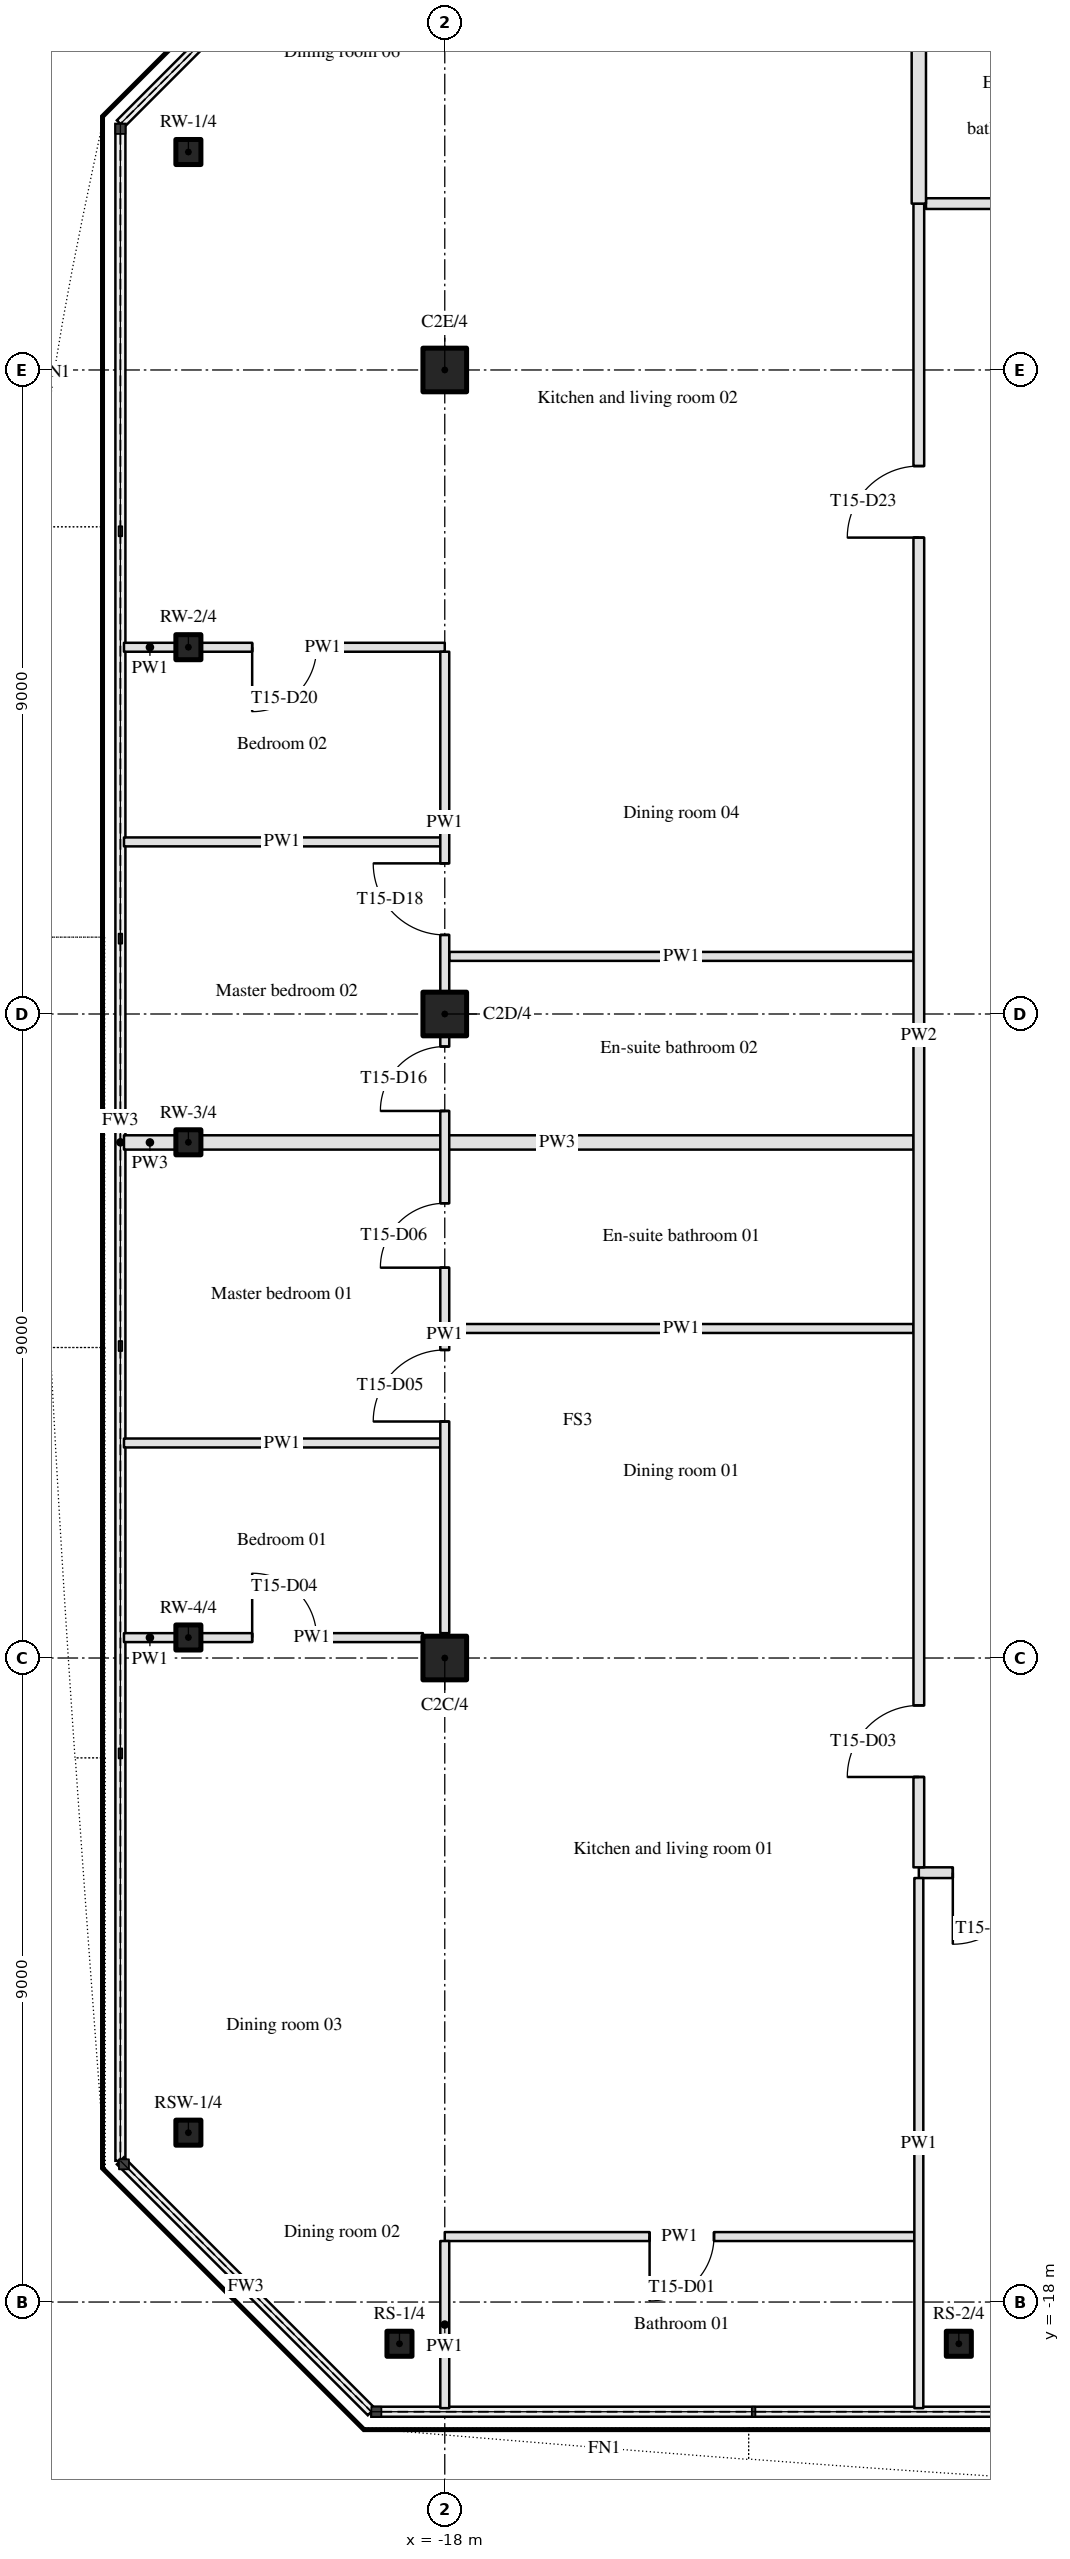
"""IFC4 building model, lengths in metres.
Left out: names, types, materials, properties, quantities, classifications, styles, units other than length and angle.
Written with IfcOpenShell. Run it as: python <this file> out.ifc"""

import sys

from ifc_helpers import new_model, si_unit, direction, frame, frame_2d, origin, origin_2d, place, context, subcontext, project, spatial, rectangle, hollow_rectangle, hollow_circle, extrude, element, fill, save


model = new_model("IFC4")
c1 = context("Model", 3, precision=1e-05, world=origin(), true_north=direction((0.0, 1.0)))
c2 = subcontext(c1, "Body", "Model", "MODEL_VIEW")
j1 = project(units=[si_unit("LENGTHUNIT", "METRE"), si_unit("PLANEANGLEUNIT", "RADIAN")], contexts=[c1])
p1 = place(None, origin())
s1 = spatial("IfcSite", under=j1, at=p1, CompositionType="ELEMENT")
p2 = place(p1, origin())
s2 = spatial("IfcBuilding", under=s1, at=p2, CompositionType="ELEMENT")
p3 = place(p2, frame((0.0, 0.0, 206.85)))
s3 = spatial("IfcBuildingStorey", under=s2, at=p3, CompositionType="ELEMENT", Elevation=206.85)
for number, where, z_axis, x_axis in (
    (1, (-18.0, -9.0, 0.0), (0.0, 0.0, 1.0), (1.0, 0.0, 0.0)),
    (2, (-18.0, 0.0, 0.0), (0.0, 0.0, 1.0), (1.0, 0.0, 0.0)),
    (3, (-18.0, 9.0, 0.0), (0.0, 0.0, 1.0), (1.0, 0.0, 0.0)),
):
    element("IfcColumn", number, at=place(p3, frame(where, z_axis=z_axis, x_axis=x_axis)), inside=s3, PredefinedType="COLUMN", context=c2, shape_type="SweptSolid", body=[
        extrude(hollow_circle(Radius=0.305, WallThickness=0.03, at=origin_2d()), origin(), (0.0, 0.0, 1.0), 3.15),
    ])
for number, where, z_axis, x_axis in (
    (4, (-18.633, -18.583, 0.0), (0.0, 0.0, 1.0), (1.0, 0.0, 0.0)),
    (5, (-10.816, -18.583, 0.0), (0.0, 0.0, 1.0), (1.0, 0.0, 0.0)),
    (6, (-21.583, 12.046, 0.0), (0.0, 0.0, 1.0), (1.0, 0.0, 0.0)),
    (7, (-21.583, 5.126, 0.0), (0.0, 0.0, 1.0), (1.0, 0.0, 0.0)),
    (8, (-21.583, -1.793, 0.0), (0.0, 0.0, 1.0), (1.0, 0.0, 0.0)),
    (9, (-21.583, -8.713, 0.0), (0.0, 0.0, 1.0), (1.0, 0.0, 0.0)),
    (10, (-21.583, -15.633, 0.0), (0.0, 0.0, 1.0), (1.0, 0.0, 0.0)),
):
    element("IfcColumn", number, at=place(p3, frame(where, z_axis=z_axis, x_axis=x_axis)), inside=s3, PredefinedType="COLUMN", context=c2, shape_type="SweptSolid", body=[
        extrude(hollow_rectangle(XDim=0.35, YDim=0.35, WallThickness=0.02, InnerFilletRadius=0.03, OuterFilletRadius=0.05, at=origin_2d()), origin(), (0.0, 0.0, 1.0), 3.15),
    ])
p4 = place(p3, frame((-11.438, -17.085, 0.0), z_axis=(0.0, 0.0, 1.0), x_axis=(-1.0, 0.0, 0.0)))
e11 = element("IfcWall", 11, at=p4, inside=s3, PredefinedType="PARTITIONING", context=c2, shape_type="SweptSolid", body=[
    extrude(rectangle(XDim=6.562, YDim=0.125, at=frame_2d((3.281, 0.0))), origin(), (0.0, 0.0, 1.0), 2.21),
])
p5 = place(p4, frame((2.8, 0.0, 0.0)))
e12 = element("IfcOpeningElement", 12, at=p5, cuts=e11, PredefinedType="OPENING", context=c2, shape_type="SweptSolid", body=[
    extrude(rectangle(XDim=0.9, YDim=2.1, at=frame_2d((0.45, 1.05))), frame((0.0, 0.073, 0.0), z_axis=(0.0, -1.0, 0.0), x_axis=(1.0, 0.0, 0.0)), (0.0, 0.0, 1.0), 0.145),
])
p6 = place(p3, frame((-9.5, -12.0, 0.0), z_axis=(0.0, 0.0, 1.0), x_axis=(-1.0, 0.0, 0.0)))
e13 = element("IfcWall", 13, at=p6, inside=s3, PredefinedType="PARTITIONING", context=c2, shape_type="SweptSolid", body=[
    extrude(rectangle(XDim=1.875, YDim=0.15, at=frame_2d((0.938, 0.0))), origin(), (0.0, 0.0, 1.0), 2.21),
])
p7 = place(p6, frame((0.4, 0.0, 0.0)))
e14 = element("IfcOpeningElement", 14, at=p7, cuts=e13, PredefinedType="OPENING", context=c2, shape_type="SweptSolid", body=[
    extrude(rectangle(XDim=1.0, YDim=2.1, at=frame_2d((0.5, 1.05))), frame((0.0, 0.085, 0.0), z_axis=(0.0, -1.0, 0.0), x_axis=(1.0, 0.0, 0.0)), (0.0, 0.0, 1.0), 0.17),
])
p8 = place(p3, frame((-22.483, -8.715, 0.0), z_axis=(0.0, 0.0, 1.0), x_axis=(1.0, 0.0, 0.0)))
e15 = element("IfcWall", 15, at=p8, inside=s3, PredefinedType="PARTITIONING", context=c2, shape_type="SweptSolid", body=[
    extrude(rectangle(XDim=0.725, YDim=0.125, at=frame_2d((0.362, 0.0))), origin(), (0.0, 0.0, 1.0), 2.21),
])
p9 = place(p3, frame((-21.408, -8.715, 0.0), z_axis=(0.0, 0.0, 1.0), x_axis=(1.0, 0.0, 0.0)))
e16 = element("IfcWall", 16, at=p9, inside=s3, PredefinedType="PARTITIONING", context=c2, shape_type="SweptSolid", body=[
    extrude(rectangle(XDim=3.103, YDim=0.125, at=frame_2d((1.552, 0.0))), origin(), (0.0, 0.0, 1.0), 2.21),
])
p10 = place(p9, frame((0.717, 0.0, 0.0)))
e17 = element("IfcOpeningElement", 17, at=p10, cuts=e16, PredefinedType="OPENING", context=c2, shape_type="SweptSolid", body=[
    extrude(rectangle(XDim=0.9, YDim=2.1, at=frame_2d((0.45, 1.05))), frame((0.0, 0.073, 0.0), z_axis=(0.0, -1.0, 0.0), x_axis=(1.0, 0.0, 0.0)), (0.0, 0.0, 1.0), 0.145),
])
p11 = place(p3, frame((-22.483, -5.995, 0.0), z_axis=(0.0, 0.0, 1.0), x_axis=(1.0, 0.0, 0.0)))
e18 = element("IfcWall", 18, at=p11, inside=s3, PredefinedType="PARTITIONING", context=c2, shape_type="SweptSolid", body=[
    extrude(rectangle(XDim=4.42, YDim=0.125, at=frame_2d((2.21, 0.0))), origin(), (0.0, 0.0, 1.0), 2.21),
])
p12 = place(p3, frame((-17.938, -4.395, 0.0), z_axis=(0.0, 0.0, 1.0), x_axis=(1.0, 0.0, 0.0)))
e19 = element("IfcWall", 19, at=p12, inside=s3, PredefinedType="PARTITIONING", context=c2, shape_type="SweptSolid", body=[
    extrude(rectangle(XDim=6.488, YDim=0.125, at=frame_2d((3.244, 0.0))), origin(), (0.0, 0.0, 1.0), 2.21),
])
p13 = place(p3, frame((-22.483, -1.795, 0.0), z_axis=(0.0, 0.0, 1.0), x_axis=(1.0, 0.0, 0.0)))
e20 = element("IfcWall", 20, at=p13, inside=s3, PredefinedType="PARTITIONING", context=c2, shape_type="SweptSolid", body=[
    extrude(rectangle(XDim=0.725, YDim=0.2, at=frame_2d((0.362, 0.0))), origin(), (0.0, 0.0, 1.0), 2.21),
])
p14 = place(p3, frame((-21.408, -1.795, 0.0), z_axis=(0.0, 0.0, 1.0), x_axis=(1.0, 0.0, 0.0)))
e21 = element("IfcWall", 21, at=p14, inside=s3, PredefinedType="PARTITIONING", context=c2, shape_type="SweptSolid", body=[
    extrude(rectangle(XDim=9.958, YDim=0.2, at=frame_2d((4.979, 0.0))), origin(), (0.0, 0.0, 1.0), 2.21),
])
p15 = place(p3, frame((-17.938, 0.805, 0.0), z_axis=(0.0, 0.0, 1.0), x_axis=(1.0, 0.0, 0.0)))
e22 = element("IfcWall", 22, at=p15, inside=s3, PredefinedType="PARTITIONING", context=c2, shape_type="SweptSolid", body=[
    extrude(rectangle(XDim=6.488, YDim=0.125, at=frame_2d((3.244, 0.0))), origin(), (0.0, 0.0, 1.0), 2.21),
])
p16 = place(p3, frame((-22.483, 2.405, 0.0), z_axis=(0.0, 0.0, 1.0), x_axis=(1.0, 0.0, 0.0)))
e23 = element("IfcWall", 23, at=p16, inside=s3, PredefinedType="PARTITIONING", context=c2, shape_type="SweptSolid", body=[
    extrude(rectangle(XDim=4.42, YDim=0.125, at=frame_2d((2.21, 0.0))), origin(), (0.0, 0.0, 1.0), 2.21),
])
p17 = place(p3, frame((-22.483, 5.125, 0.0), z_axis=(0.0, 0.0, 1.0), x_axis=(1.0, 0.0, 0.0)))
e24 = element("IfcWall", 24, at=p17, inside=s3, PredefinedType="PARTITIONING", context=c2, shape_type="SweptSolid", body=[
    extrude(rectangle(XDim=0.725, YDim=0.125, at=frame_2d((0.362, 0.0))), origin(), (0.0, 0.0, 1.0), 2.21),
])
p18 = place(p3, frame((-18.0, 5.125, 0.0), z_axis=(0.0, 0.0, 1.0), x_axis=(-1.0, 0.0, 0.0)))
e25 = element("IfcWall", 25, at=p18, inside=s3, PredefinedType="PARTITIONING", context=c2, shape_type="SweptSolid", body=[
    extrude(rectangle(XDim=3.408, YDim=0.125, at=frame_2d((1.704, 0.0))), origin(), (0.0, 0.0, 1.0), 2.21),
])
p19 = place(p18, frame((1.792, 0.0, 0.0)))
e26 = element("IfcOpeningElement", 26, at=p19, cuts=e25, PredefinedType="OPENING", context=c2, shape_type="SweptSolid", body=[
    extrude(rectangle(XDim=0.9, YDim=2.1, at=frame_2d((0.45, 1.05))), frame((0.0, 0.073, 0.0), z_axis=(0.0, -1.0, 0.0), x_axis=(1.0, 0.0, 0.0)), (0.0, 0.0, 1.0), 0.145),
])
p20 = place(p3, frame((-11.275, 11.325, 0.0), z_axis=(0.0, 0.0, 1.0), x_axis=(1.0, 0.0, 0.0)))
e27 = element("IfcWall", 27, at=p20, inside=s3, PredefinedType="PARTITIONING", context=c2, shape_type="SweptSolid", body=[
    extrude(rectangle(XDim=22.575, YDim=0.15, at=frame_2d((11.288, 0.0))), origin(), (0.0, 0.0, 1.0), 2.21),
])
p21 = place(p20, frame((12.63, 0.0, 0.0)))
e28 = element("IfcOpeningElement", 28, at=p21, cuts=e27, PredefinedType="OPENING", context=c2, shape_type="SweptSolid", body=[
    extrude(rectangle(XDim=1.0, YDim=2.1, at=frame_2d((0.5, 1.05))), frame((0.0, 0.085, 0.0), z_axis=(0.0, -1.0, 0.0), x_axis=(1.0, 0.0, 0.0)), (0.0, 0.0, 1.0), 0.17),
])
p22 = place(p20, frame((21.175, 0.0, 0.0)))
e29 = element("IfcOpeningElement", 29, at=p22, cuts=e27, PredefinedType="OPENING", context=c2, shape_type="SweptSolid", body=[
    extrude(rectangle(XDim=1.0, YDim=2.1, at=frame_2d((0.5, 1.05))), frame((0.0, 0.085, 0.0), z_axis=(0.0, -1.0, 0.0), x_axis=(1.0, 0.0, 0.0)), (0.0, 0.0, 1.0), 0.17),
])
p23 = place(p3, frame((-18.0, -19.483, 0.0), z_axis=(0.0, 0.0, 1.0), x_axis=(0.0, 1.0, 0.0)))
e30 = element("IfcWall", 30, at=p23, inside=s3, PredefinedType="PARTITIONING", context=c2, shape_type="SweptSolid", body=[
    extrude(rectangle(XDim=2.335, YDim=0.125, at=frame_2d((1.168, 0.0))), origin(), (0.0, 0.0, 1.0), 2.21),
])
p24 = place(p3, frame((-18.0, -8.653, 0.0), z_axis=(0.0, 0.0, 1.0), x_axis=(0.0, 1.0, 0.0)))
e31 = element("IfcWall", 31, at=p24, inside=s3, PredefinedType="PARTITIONING", context=c2, shape_type="SweptSolid", body=[
    extrude(rectangle(XDim=8.348, YDim=0.125, at=frame_2d((4.174, 0.0))), origin(), (0.0, 0.0, 1.0), 2.21),
])
p25 = place(p24, frame((2.958, 0.0, 0.0)))
e32 = element("IfcOpeningElement", 32, at=p25, cuts=e31, PredefinedType="OPENING", context=c2, shape_type="SweptSolid", body=[
    extrude(rectangle(XDim=1.0, YDim=2.1, at=frame_2d((0.5, 1.05))), frame((0.0, 0.073, 0.0), z_axis=(0.0, -1.0, 0.0), x_axis=(1.0, 0.0, 0.0)), (0.0, 0.0, 1.0), 0.145),
])
p26 = place(p24, frame((5.107, 0.0, 0.0)))
e33 = element("IfcOpeningElement", 33, at=p26, cuts=e31, PredefinedType="OPENING", context=c2, shape_type="SweptSolid", body=[
    extrude(rectangle(XDim=0.9, YDim=2.1, at=frame_2d((0.45, 1.05))), frame((0.0, 0.073, 0.0), z_axis=(0.0, -1.0, 0.0), x_axis=(1.0, 0.0, 0.0)), (0.0, 0.0, 1.0), 0.145),
])
p27 = place(p24, frame((7.298, 0.0, 0.0)))
e34 = element("IfcOpeningElement", 34, at=p27, cuts=e31, PredefinedType="OPENING", context=c2, shape_type="SweptSolid", body=[
    extrude(rectangle(XDim=0.9, YDim=2.1, at=frame_2d((0.45, 1.05))), frame((0.0, 0.073, 0.0), z_axis=(0.0, -1.0, 0.0), x_axis=(1.0, 0.0, 0.0)), (0.0, 0.0, 1.0), 0.145),
])
p28 = place(p3, frame((-18.0, 0.305, 0.0), z_axis=(0.0, 0.0, 1.0), x_axis=(0.0, 1.0, 0.0)))
e35 = element("IfcWall", 35, at=p28, inside=s3, PredefinedType="PARTITIONING", context=c2, shape_type="SweptSolid", body=[
    extrude(rectangle(XDim=4.758, YDim=0.125, at=frame_2d((2.379, 0.0))), origin(), (0.0, 0.0, 1.0), 2.21),
])
p29 = place(p28, frame((0.8, 0.0, 0.0)))
e36 = element("IfcOpeningElement", 36, at=p29, cuts=e35, PredefinedType="OPENING", context=c2, shape_type="SweptSolid", body=[
    extrude(rectangle(XDim=1.0, YDim=2.1, at=frame_2d((0.5, 1.05))), frame((0.0, 0.073, 0.0), z_axis=(0.0, -1.0, 0.0), x_axis=(1.0, 0.0, 0.0)), (0.0, 0.0, 1.0), 0.145),
])
p30 = place(p3, frame((-11.375, -19.483, 0.0), z_axis=(0.0, 0.0, 1.0), x_axis=(0.0, 1.0, 0.0)))
e37 = element("IfcWall", 37, at=p30, inside=s3, PredefinedType="PARTITIONING", context=c2, shape_type="SweptSolid", body=[
    extrude(rectangle(XDim=7.408, YDim=0.125, at=frame_2d((3.704, 0.0))), origin(), (0.0, 0.0, 1.0), 2.21),
])
p31 = place(p3, frame((-11.375, -11.925, 0.0), z_axis=(0.0, 0.0, 1.0), x_axis=(0.0, 1.0, 0.0)))
e38 = element("IfcWall", 38, at=p31, inside=s3, PredefinedType="PARTITIONING", context=c2, shape_type="SweptSolid", body=[
    extrude(rectangle(XDim=23.25, YDim=0.15, at=frame_2d((11.625, 0.0))), origin(), (0.0, 0.0, 1.0), 2.21),
])
p32 = place(p31, frame((1.262, 0.0, 0.0)))
e39 = element("IfcOpeningElement", 39, at=p32, cuts=e38, PredefinedType="OPENING", context=c2, shape_type="SweptSolid", body=[
    extrude(rectangle(XDim=1.0, YDim=2.1, at=frame_2d((0.5, 1.05))), frame((0.0, 0.085, 0.0), z_axis=(0.0, -1.0, 0.0), x_axis=(1.0, 0.0, 0.0)), (0.0, 0.0, 1.0), 0.17),
])
p33 = place(p31, frame((18.583, 0.0, 0.0)))
e40 = element("IfcOpeningElement", 40, at=p33, cuts=e38, PredefinedType="OPENING", context=c2, shape_type="SweptSolid", body=[
    extrude(rectangle(XDim=1.0, YDim=2.1, at=frame_2d((0.5, 1.05))), frame((0.0, 0.085, 0.0), z_axis=(0.0, -1.0, 0.0), x_axis=(1.0, 0.0, 0.0)), (0.0, 0.0, 1.0), 0.17),
])
p34 = place(p3, frame((-11.375, 11.325, 0.0), z_axis=(0.0, 0.0, 1.0), x_axis=(0.0, 1.0, 0.0)))
e41 = element("IfcWall", 41, at=p34, inside=s3, PredefinedType="PARTITIONING", context=c2, shape_type="SweptSolid", body=[
    extrude(rectangle(XDim=8.158, YDim=0.2, at=frame_2d((4.079, 0.0))), origin(), (0.0, 0.0, 1.0), 2.21),
])
p35 = place(p32, origin())
e42 = element("IfcDoor", 42, at=p35, inside=s3, OperationType="SINGLE_SWING_LEFT", PredefinedType="DOOR", context=c2, shape_type="SweptSolid", body=[
    extrude(rectangle(XDim=1.0, YDim=2.1, at=frame_2d((0.5, 1.05))), frame((0.0, 0.025, 0.0), z_axis=(0.0, -1.0, 0.0), x_axis=(1.0, 0.0, 0.0)), (0.0, 0.0, 1.0), 0.05),
])
fill(e39, e42)
p36 = place(p33, origin())
e43 = element("IfcDoor", 43, at=p36, inside=s3, OperationType="SINGLE_SWING_LEFT", PredefinedType="DOOR", context=c2, shape_type="SweptSolid", body=[
    extrude(rectangle(XDim=1.0, YDim=2.1, at=frame_2d((0.5, 1.05))), frame((0.0, 0.025, 0.0), z_axis=(0.0, -1.0, 0.0), x_axis=(1.0, 0.0, 0.0)), (0.0, 0.0, 1.0), 0.05),
])
fill(e40, e43)
p37 = place(p25, origin())
e44 = element("IfcDoor", 44, at=p37, inside=s3, OperationType="SINGLE_SWING_LEFT", PredefinedType="DOOR", context=c2, shape_type="SweptSolid", body=[
    extrude(rectangle(XDim=1.0, YDim=2.1, at=frame_2d((0.5, 1.05))), frame((0.0, 0.025, 0.0), z_axis=(0.0, -1.0, 0.0), x_axis=(1.0, 0.0, 0.0)), (0.0, 0.0, 1.0), 0.05),
])
fill(e32, e44)
p38 = place(p5, origin())
e45 = element("IfcDoor", 45, at=p38, inside=s3, OperationType="SINGLE_SWING_RIGHT", PredefinedType="DOOR", context=c2, shape_type="SweptSolid", body=[
    extrude(rectangle(XDim=0.9, YDim=2.1, at=frame_2d((0.45, 1.05))), frame((0.0, 0.025, 0.0), z_axis=(0.0, -1.0, 0.0), x_axis=(1.0, 0.0, 0.0)), (0.0, 0.0, 1.0), 0.05),
])
fill(e12, e45)
p39 = place(p10, origin())
e46 = element("IfcDoor", 46, at=p39, inside=s3, OperationType="SINGLE_SWING_LEFT", PredefinedType="DOOR", context=c2, shape_type="SweptSolid", body=[
    extrude(rectangle(XDim=0.9, YDim=2.1, at=frame_2d((0.45, 1.05))), frame((0.0, 0.025, 0.0), z_axis=(0.0, -1.0, 0.0), x_axis=(1.0, 0.0, 0.0)), (0.0, 0.0, 1.0), 0.05),
])
fill(e17, e46)
p40 = place(p26, origin())
e47 = element("IfcDoor", 47, at=p40, inside=s3, OperationType="SINGLE_SWING_LEFT", PredefinedType="DOOR", context=c2, shape_type="SweptSolid", body=[
    extrude(rectangle(XDim=0.9, YDim=2.1, at=frame_2d((0.45, 1.05))), frame((0.0, 0.025, 0.0), z_axis=(0.0, -1.0, 0.0), x_axis=(1.0, 0.0, 0.0)), (0.0, 0.0, 1.0), 0.05),
])
fill(e33, e47)
p41 = place(p29, origin())
e48 = element("IfcDoor", 48, at=p41, inside=s3, OperationType="SINGLE_SWING_RIGHT", PredefinedType="DOOR", context=c2, shape_type="SweptSolid", body=[
    extrude(rectangle(XDim=1.0, YDim=2.1, at=frame_2d((0.5, 1.05))), frame((0.0, 0.025, 0.0), z_axis=(0.0, -1.0, 0.0), x_axis=(1.0, 0.0, 0.0)), (0.0, 0.0, 1.0), 0.05),
])
fill(e36, e48)
p42 = place(p19, origin())
e49 = element("IfcDoor", 49, at=p42, inside=s3, OperationType="SINGLE_SWING_RIGHT", PredefinedType="DOOR", context=c2, shape_type="SweptSolid", body=[
    extrude(rectangle(XDim=0.9, YDim=2.1, at=frame_2d((0.45, 1.05))), frame((0.0, 0.025, 0.0), z_axis=(0.0, -1.0, 0.0), x_axis=(1.0, 0.0, 0.0)), (0.0, 0.0, 1.0), 0.05),
])
fill(e26, e49)
p43 = place(p27, origin())
e50 = element("IfcDoor", 50, at=p43, inside=s3, OperationType="SINGLE_SWING_LEFT", PredefinedType="DOOR", context=c2, shape_type="SweptSolid", body=[
    extrude(rectangle(XDim=0.9, YDim=2.1, at=frame_2d((0.45, 1.05))), frame((0.0, 0.025, 0.0), z_axis=(0.0, -1.0, 0.0), x_axis=(1.0, 0.0, 0.0)), (0.0, 0.0, 1.0), 0.05),
])
fill(e34, e50)
p44 = place(p7, origin())
e51 = element("IfcDoor", 51, at=p44, inside=s3, OperationType="SINGLE_SWING_RIGHT", PredefinedType="DOOR", context=c2, shape_type="SweptSolid", body=[
    extrude(rectangle(XDim=1.0, YDim=2.1, at=frame_2d((0.5, 1.05))), frame((0.0, 0.025, 0.0), z_axis=(0.0, -1.0, 0.0), x_axis=(1.0, 0.0, 0.0)), (0.0, 0.0, 1.0), 0.05),
])
fill(e14, e51)
save(model, sys.argv[1])
